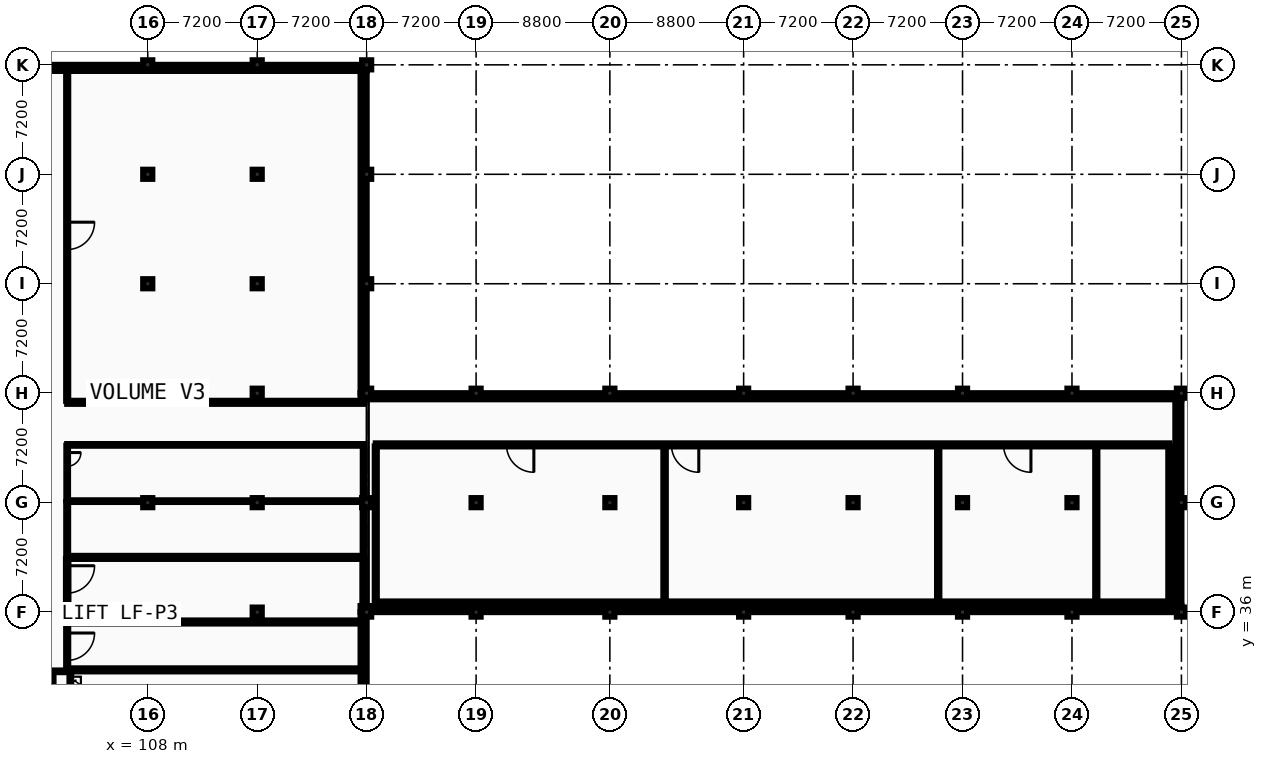
"""IFC4 building model, lengths in metres.
Left out: names, types, materials, properties, quantities, classifications, styles, units other than length and angle.
Written with IfcOpenShell. Run it as: python <this file> out.ifc"""

import sys

from ifc_helpers import new_model, si_unit, direction, frame, frame_2d, origin, origin_2d, place, context, subcontext, project, spatial, rectangle, extrude, element, fill, save


model = new_model("IFC4")
c1 = context("Model", 3, precision=1e-05, world=origin(), true_north=direction((0.0, 1.0)))
c2 = subcontext(c1, "Body", "Model", "MODEL_VIEW")
j1 = project(units=[si_unit("LENGTHUNIT", "METRE"), si_unit("PLANEANGLEUNIT", "RADIAN")], contexts=[c1])
p1 = place(None, origin())
s1 = spatial("IfcSite", under=j1, at=p1, CompositionType="ELEMENT")
p2 = place(p1, origin())
s2 = spatial("IfcBuilding", under=s1, at=p2, CompositionType="ELEMENT")
p3 = place(p2, frame((0.0, 0.0, -4.8)))
s3 = spatial("IfcBuildingStorey", under=s2, at=p3, CompositionType="ELEMENT", Elevation=-4.8)
for number, where, z_axis, x_axis in (
    (1, (108.0, 36.0, 0.0), (0.0, 0.0, 1.0), (1.0, 0.0, 0.0)),
    (2, (108.0, 43.2, 0.0), (0.0, 0.0, 1.0), (1.0, 0.0, 0.0)),
    (3, (108.0, 50.4, 0.0), (0.0, 0.0, 1.0), (1.0, 0.0, 0.0)),
    (4, (108.0, 57.6, 0.0), (0.0, 0.0, 1.0), (1.0, 0.0, 0.0)),
    (5, (108.0, 64.8, 0.0), (0.0, 0.0, 1.0), (1.0, 0.0, 0.0)),
    (6, (108.0, 72.0, 0.0), (0.0, 0.0, 1.0), (1.0, 0.0, 0.0)),
    (7, (115.2, 36.0, 0.0), (0.0, 0.0, 1.0), (1.0, 0.0, 0.0)),
    (8, (115.2, 43.2, 0.0), (0.0, 0.0, 1.0), (1.0, 0.0, 0.0)),
    (9, (115.2, 50.4, 0.0), (0.0, 0.0, 1.0), (1.0, 0.0, 0.0)),
    (10, (115.2, 57.6, 0.0), (0.0, 0.0, 1.0), (1.0, 0.0, 0.0)),
    (11, (115.2, 64.8, 0.0), (0.0, 0.0, 1.0), (1.0, 0.0, 0.0)),
    (12, (115.2, 72.0, 0.0), (0.0, 0.0, 1.0), (1.0, 0.0, 0.0)),
    (13, (122.4, 36.0, 0.0), (0.0, 0.0, 1.0), (1.0, 0.0, 0.0)),
    (14, (122.4, 43.2, 0.0), (0.0, 0.0, 1.0), (1.0, 0.0, 0.0)),
    (15, (122.4, 50.4, 0.0), (0.0, 0.0, 1.0), (1.0, 0.0, 0.0)),
    (16, (122.4, 57.6, 0.0), (0.0, 0.0, 1.0), (1.0, 0.0, 0.0)),
    (17, (122.4, 64.8, 0.0), (0.0, 0.0, 1.0), (1.0, 0.0, 0.0)),
    (18, (122.4, 72.0, 0.0), (0.0, 0.0, 1.0), (1.0, 0.0, 0.0)),
    (19, (129.6, 36.0, 0.0), (0.0, 0.0, 1.0), (1.0, 0.0, 0.0)),
    (20, (129.6, 43.2, 0.0), (0.0, 0.0, 1.0), (1.0, 0.0, 0.0)),
    (21, (129.6, 50.4, 0.0), (0.0, 0.0, 1.0), (1.0, 0.0, 0.0)),
    (22, (138.4, 36.0, 0.0), (0.0, 0.0, 1.0), (1.0, 0.0, 0.0)),
    (23, (138.4, 43.2, 0.0), (0.0, 0.0, 1.0), (1.0, 0.0, 0.0)),
    (24, (138.4, 50.4, 0.0), (0.0, 0.0, 1.0), (1.0, 0.0, 0.0)),
    (25, (147.2, 36.0, 0.0), (0.0, 0.0, 1.0), (1.0, 0.0, 0.0)),
    (26, (147.2, 43.2, 0.0), (0.0, 0.0, 1.0), (1.0, 0.0, 0.0)),
    (27, (147.2, 50.4, 0.0), (0.0, 0.0, 1.0), (1.0, 0.0, 0.0)),
    (28, (154.4, 36.0, 0.0), (0.0, 0.0, 1.0), (1.0, 0.0, 0.0)),
    (29, (154.4, 43.2, 0.0), (0.0, 0.0, 1.0), (1.0, 0.0, 0.0)),
    (30, (154.4, 50.4, 0.0), (0.0, 0.0, 1.0), (1.0, 0.0, 0.0)),
    (31, (161.6, 36.0, 0.0), (0.0, 0.0, 1.0), (1.0, 0.0, 0.0)),
    (32, (161.6, 43.2, 0.0), (0.0, 0.0, 1.0), (1.0, 0.0, 0.0)),
    (33, (161.6, 50.4, 0.0), (0.0, 0.0, 1.0), (1.0, 0.0, 0.0)),
    (34, (168.8, 36.0, 0.0), (0.0, 0.0, 1.0), (1.0, 0.0, 0.0)),
    (35, (168.8, 43.2, 0.0), (0.0, 0.0, 1.0), (1.0, 0.0, 0.0)),
    (36, (168.8, 50.4, 0.0), (0.0, 0.0, 1.0), (1.0, 0.0, 0.0)),
    (37, (176.0, 36.0, 0.0), (0.0, 0.0, 1.0), (1.0, 0.0, 0.0)),
    (38, (176.0, 43.2, 0.0), (0.0, 0.0, 1.0), (1.0, 0.0, 0.0)),
    (39, (176.0, 50.4, 0.0), (0.0, 0.0, 1.0), (1.0, 0.0, 0.0)),
):
    element("IfcColumn", number, at=place(p3, frame(where, z_axis=z_axis, x_axis=x_axis)), inside=s3, PredefinedType="COLUMN", context=c2, shape_type="SweptSolid", body=[
        extrude(rectangle(XDim=0.6, YDim=0.6, at=origin_2d()), origin(), (0.0, 0.0, 1.0), 4.8),
    ])
p4 = place(p3, frame((122.2, 29.2, 0.0), z_axis=(0.0, 0.0, 1.0), x_axis=(0.0, 1.0, 0.0)))
e40 = element("IfcWall", 40, at=p4, inside=s3, PredefinedType="USERDEFINED", context=c2, shape_type="SweptSolid", body=[
    extrude(rectangle(XDim=6.8, YDim=0.4, at=frame_2d((3.4, 0.0))), origin(), (0.0, 0.0, 1.0), 4.545),
])
p5 = place(p3, frame((122.0, 36.2, 0.0), z_axis=(0.0, 0.0, 1.0), x_axis=(1.0, 0.0, 0.0)))
e41 = element("IfcWall", 41, at=p5, inside=s3, PredefinedType="USERDEFINED", context=c2, shape_type="SweptSolid", body=[
    extrude(rectangle(XDim=54.0, YDim=0.4, at=frame_2d((27.0, 0.0))), origin(), (0.0, 0.0, 1.0), 4.545),
])
p6 = place(p3, frame((175.8, 36.4, 0.0), z_axis=(0.0, 0.0, 1.0), x_axis=(0.0, 1.0, 0.0)))
e42 = element("IfcWall", 42, at=p6, inside=s3, PredefinedType="USERDEFINED", context=c2, shape_type="SweptSolid", body=[
    extrude(rectangle(XDim=13.6, YDim=0.4, at=frame_2d((6.8, 0.0))), origin(), (0.0, 0.0, 1.0), 4.545),
])
p7 = place(p3, frame((176.0, 50.2, 0.0), z_axis=(0.0, 0.0, 1.0), x_axis=(-1.0, 0.0, 0.0)))
e43 = element("IfcWall", 43, at=p7, inside=s3, PredefinedType="USERDEFINED", context=c2, shape_type="SweptSolid", body=[
    extrude(rectangle(XDim=54.0, YDim=0.4, at=frame_2d((27.0, 0.0))), origin(), (0.0, 0.0, 1.0), 4.545),
])
p8 = place(p3, frame((122.2, 50.4, 0.0), z_axis=(0.0, 0.0, 1.0), x_axis=(0.0, 1.0, 0.0)))
e44 = element("IfcWall", 44, at=p8, inside=s3, PredefinedType="USERDEFINED", context=c2, shape_type="SweptSolid", body=[
    extrude(rectangle(XDim=21.2, YDim=0.4, at=frame_2d((10.6, 0.0))), origin(), (0.0, 0.0, 1.0), 4.545),
])
p9 = place(p3, frame((122.4, 71.8, 0.0), z_axis=(0.0, 0.0, 1.0), x_axis=(-1.0, 0.0, 0.0)))
e45 = element("IfcWall", 45, at=p9, inside=s3, PredefinedType="USERDEFINED", context=c2, shape_type="SweptSolid", body=[
    extrude(rectangle(XDim=29.2, YDim=0.4, at=frame_2d((14.6, 0.0))), origin(), (0.0, 0.0, 1.0), 4.545),
])
p10 = place(p3, frame((101.69, 32.105, 0.0), z_axis=(0.0, 0.0, 1.0), x_axis=(1.0, 0.0, 0.0)))
e46 = element("IfcWall", 46, at=p10, inside=s3, PredefinedType="PARTITIONING", context=c2, shape_type="SweptSolid", body=[
    extrude(rectangle(XDim=1.27, YDim=0.11, at=frame_2d((0.635, 0.0))), origin(), (0.0, 0.0, 1.0), 4.54),
])
for number, where, z_axis, x_axis in (
    (47, (101.745, 31.0, 0.0), (0.0, 0.0, 1.0), (0.0, 1.0, 0.0)),
    (48, (102.905, 31.0, 0.0), (0.0, 0.0, 1.0), (0.0, 1.0, 0.0)),
):
    element("IfcWall", number, at=place(p3, frame(where, z_axis=z_axis, x_axis=x_axis)), inside=s3, PredefinedType="PARTITIONING", context=c2, shape_type="SweptSolid", body=[
        extrude(rectangle(XDim=1.05, YDim=0.11, at=frame_2d((0.525, 0.0))), origin(), (0.0, 0.0, 1.0), 4.54),
    ])
p11 = place(p3, frame((103.035, 32.2, 0.0), z_axis=(0.0, 0.0, 1.0), x_axis=(1.0, 0.0, 0.0)))
e49 = element("IfcWall", 49, at=p11, inside=s3, PredefinedType="PARTITIONING", context=c2, shape_type="SweptSolid", body=[
    extrude(rectangle(XDim=18.945, YDim=0.2, at=frame_2d((9.473, 0.0))), origin(), (0.0, 0.0, 1.0), 4.545),
])
p12 = place(p3, frame((102.7, 35.35, 0.0), z_axis=(0.0, 0.0, 1.0), x_axis=(1.0, 0.0, 0.0)))
e50 = element("IfcWall", 50, at=p12, inside=s3, PredefinedType="PARTITIONING", context=c2, shape_type="SweptSolid", body=[
    extrude(rectangle(XDim=19.28, YDim=0.2, at=frame_2d((9.64, 0.0))), origin(), (0.0, 0.0, 1.0), 4.545),
])
p13 = place(p3, frame((123.0, 36.6, 0.0), z_axis=(0.0, 0.0, 1.0), x_axis=(1.0, 0.0, 0.0)))
e51 = element("IfcWall", 51, at=p13, inside=s3, PredefinedType="PARTITIONING", context=c2, shape_type="SweptSolid", body=[
    extrude(rectangle(XDim=52.2, YDim=0.2, at=frame_2d((26.1, 0.0))), origin(), (0.0, 0.0, 1.0), 4.545),
])
p14 = place(p3, frame((102.7, 39.6, 0.0), z_axis=(0.0, 0.0, 1.0), x_axis=(1.0, 0.0, 0.0)))
e52 = element("IfcWall", 52, at=p14, inside=s3, PredefinedType="PARTITIONING", context=c2, shape_type="SweptSolid", body=[
    extrude(rectangle(XDim=19.5, YDim=0.2, at=frame_2d((9.75, 0.0))), origin(), (0.0, 0.0, 1.0), 4.545),
])
p15 = place(p3, frame((102.7, 43.3, 0.0), z_axis=(0.0, 0.0, 1.0), x_axis=(1.0, 0.0, 0.0)))
e53 = element("IfcWall", 53, at=p15, inside=s3, PredefinedType="PARTITIONING", context=c2, shape_type="SweptSolid", body=[
    extrude(rectangle(XDim=4.92, YDim=0.11, at=frame_2d((2.46, 0.0))), origin(), (0.0, 0.0, 1.0), 4.095),
])
p16 = place(p3, frame((108.38, 43.3, 0.0), z_axis=(0.0, 0.0, 1.0), x_axis=(1.0, 0.0, 0.0)))
e54 = element("IfcWall", 54, at=p16, inside=s3, PredefinedType="PARTITIONING", context=c2, shape_type="SweptSolid", body=[
    extrude(rectangle(XDim=6.44, YDim=0.11, at=frame_2d((3.22, 0.0))), origin(), (0.0, 0.0, 1.0), 4.095),
])
p17 = place(p3, frame((115.58, 43.3, 0.0), z_axis=(0.0, 0.0, 1.0), x_axis=(1.0, 0.0, 0.0)))
e55 = element("IfcWall", 55, at=p17, inside=s3, PredefinedType="PARTITIONING", context=c2, shape_type="SweptSolid", body=[
    extrude(rectangle(XDim=6.44, YDim=0.11, at=frame_2d((3.22, 0.0))), origin(), (0.0, 0.0, 1.0), 4.095),
])
p18 = place(p3, frame((102.7, 47.0, 0.0), z_axis=(0.0, 0.0, 1.0), x_axis=(1.0, 0.0, 0.0)))
e56 = element("IfcWall", 56, at=p18, inside=s3, PredefinedType="PARTITIONING", context=c2, shape_type="SweptSolid", body=[
    extrude(rectangle(XDim=19.5, YDim=0.11, at=frame_2d((9.75, 0.0))), origin(), (0.0, 0.0, 1.0), 4.545),
])
p19 = place(p3, frame((123.0, 47.0, 0.0), z_axis=(0.0, 0.0, 1.0), x_axis=(1.0, 0.0, 0.0)))
e57 = element("IfcWall", 57, at=p19, inside=s3, PredefinedType="PARTITIONING", context=c2, shape_type="SweptSolid", body=[
    extrude(rectangle(XDim=52.2, YDim=0.2, at=frame_2d((26.1, 0.0))), origin(), (0.0, 0.0, 1.0), 4.545),
])
p20 = place(p19, frame((8.6, 0.0, 0.0)))
e58 = element("IfcOpeningElement", 58, at=p20, cuts=e57, PredefinedType="OPENING", context=c2, shape_type="SweptSolid", body=[
    extrude(rectangle(XDim=1.8, YDim=2.3, at=frame_2d((0.9, 1.15))), frame((0.0, 0.11, 0.0), z_axis=(0.0, -1.0, 0.0), x_axis=(1.0, 0.0, 0.0)), (0.0, 0.0, 1.0), 0.22),
])
p21 = place(p19, frame((19.45, 0.0, 0.0)))
e59 = element("IfcOpeningElement", 59, at=p21, cuts=e57, PredefinedType="OPENING", context=c2, shape_type="SweptSolid", body=[
    extrude(rectangle(XDim=1.8, YDim=2.3, at=frame_2d((0.9, 1.15))), frame((0.0, 0.11, 0.0), z_axis=(0.0, -1.0, 0.0), x_axis=(1.0, 0.0, 0.0)), (0.0, 0.0, 1.0), 0.22),
])
p22 = place(p19, frame((41.3, 0.0, 0.0)))
e60 = element("IfcOpeningElement", 60, at=p22, cuts=e57, PredefinedType="OPENING", context=c2, shape_type="SweptSolid", body=[
    extrude(rectangle(XDim=1.8, YDim=2.3, at=frame_2d((0.9, 1.15))), frame((0.0, 0.11, 0.0), z_axis=(0.0, -1.0, 0.0), x_axis=(1.0, 0.0, 0.0)), (0.0, 0.0, 1.0), 0.22),
])
p23 = place(p19, frame((49.3, 0.0, 0.0)))
e61 = element("IfcOpeningElement", 61, at=p23, cuts=e57, PredefinedType="OPENING", context=c2, shape_type="SweptSolid", body=[
    extrude(rectangle(XDim=1.0, YDim=2.1, at=frame_2d((0.5, 1.05))), frame((0.0, 0.11, 0.0), z_axis=(0.0, -1.0, 0.0), x_axis=(1.0, 0.0, 0.0)), (0.0, 0.0, 1.0), 0.22),
])
p24 = place(p3, frame((102.7, 49.8, 0.0), z_axis=(0.0, 0.0, 1.0), x_axis=(1.0, 0.0, 0.0)))
e62 = element("IfcWall", 62, at=p24, inside=s3, PredefinedType="PARTITIONING", context=c2, shape_type="SweptSolid", body=[
    extrude(rectangle(XDim=19.5, YDim=0.2, at=frame_2d((9.75, 0.0))), origin(), (0.0, 0.0, 1.0), 4.545),
])
p25 = place(p3, frame((102.7, 32.2, 0.0), z_axis=(0.0, 0.0, 1.0), x_axis=(0.0, 1.0, 0.0)))
e63 = element("IfcWall", 63, at=p25, inside=s3, PredefinedType="PARTITIONING", context=c2, shape_type="SweptSolid", body=[
    extrude(rectangle(XDim=3.05, YDim=0.135, at=frame_2d((1.525, 0.0))), origin(), (0.0, 0.0, 1.0), 4.545),
])
p26 = place(p25, frame((0.625, 0.0, 0.0)))
e64 = element("IfcOpeningElement", 64, at=p26, cuts=e63, PredefinedType="OPENING", context=c2, shape_type="SweptSolid", body=[
    extrude(rectangle(XDim=1.8, YDim=2.3, at=frame_2d((0.9, 1.15))), frame((0.0, 0.078, 0.0), z_axis=(0.0, -1.0, 0.0), x_axis=(1.0, 0.0, 0.0)), (0.0, 0.0, 1.0), 0.155),
])
p27 = place(p3, frame((102.7, 35.45, 0.0), z_axis=(0.0, 0.0, 1.0), x_axis=(0.0, 1.0, 0.0)))
e65 = element("IfcWall", 65, at=p27, inside=s3, PredefinedType="PARTITIONING", context=c2, shape_type="SweptSolid", body=[
    extrude(rectangle(XDim=4.05, YDim=0.16, at=frame_2d((2.025, 0.0))), origin(), (0.0, 0.0, 1.0), 4.545),
])
p28 = place(p27, frame((1.8, 0.0, 0.0)))
e66 = element("IfcOpeningElement", 66, at=p28, cuts=e65, PredefinedType="OPENING", context=c2, shape_type="SweptSolid", body=[
    extrude(rectangle(XDim=1.8, YDim=2.3, at=frame_2d((0.9, 1.15))), frame((0.0, 0.09, 0.0), z_axis=(0.0, -1.0, 0.0), x_axis=(1.0, 0.0, 0.0)), (0.0, 0.0, 1.0), 0.18),
])
p29 = place(p3, frame((102.7, 39.7, 0.0), z_axis=(0.0, 0.0, 1.0), x_axis=(0.0, 1.0, 0.0)))
e67 = element("IfcWall", 67, at=p29, inside=s3, PredefinedType="PARTITIONING", context=c2, shape_type="SweptSolid", body=[
    extrude(rectangle(XDim=3.545, YDim=0.125, at=frame_2d((1.772, 0.0))), origin(), (0.0, 0.0, 1.0), 4.545),
])
p30 = place(p29, frame((0.45, 0.0, 0.0)))
e68 = element("IfcOpeningElement", 68, at=p30, cuts=e67, PredefinedType="OPENING", context=c2, shape_type="SweptSolid", body=[
    extrude(rectangle(XDim=1.0, YDim=2.1, at=frame_2d((0.5, 1.05))), frame((0.0, 0.073, 0.0), z_axis=(0.0, -1.0, 0.0), x_axis=(1.0, 0.0, 0.0)), (0.0, 0.0, 1.0), 0.145),
])
p31 = place(p3, frame((102.7, 43.355, 0.0), z_axis=(0.0, 0.0, 1.0), x_axis=(0.0, 1.0, 0.0)))
e69 = element("IfcWall", 69, at=p31, inside=s3, PredefinedType="PARTITIONING", context=c2, shape_type="SweptSolid", body=[
    extrude(rectangle(XDim=3.59, YDim=0.11, at=frame_2d((1.795, 0.0))), origin(), (0.0, 0.0, 1.0), 4.545),
])
p32 = place(p31, frame((2.24, 0.0, 0.0)))
e70 = element("IfcOpeningElement", 70, at=p32, cuts=e69, PredefinedType="OPENING", context=c2, shape_type="SweptSolid", body=[
    extrude(rectangle(XDim=0.9, YDim=2.1, at=frame_2d((0.45, 1.05))), frame((0.0, 0.065, 0.0), z_axis=(0.0, -1.0, 0.0), x_axis=(1.0, 0.0, 0.0)), (0.0, 0.0, 1.0), 0.13),
])
p33 = place(p3, frame((102.7, 49.9, 0.0), z_axis=(0.0, 0.0, 1.0), x_axis=(0.0, 1.0, 0.0)))
e71 = element("IfcWall", 71, at=p33, inside=s3, PredefinedType="PARTITIONING", context=c2, shape_type="SweptSolid", body=[
    extrude(rectangle(XDim=21.7, YDim=0.135, at=frame_2d((10.85, 0.0))), origin(), (0.0, 0.0, 1.0), 4.545),
])
p34 = place(p33, frame((9.95, 0.0, 0.0)))
e72 = element("IfcOpeningElement", 72, at=p34, cuts=e71, PredefinedType="OPENING", context=c2, shape_type="SweptSolid", body=[
    extrude(rectangle(XDim=1.8, YDim=2.3, at=frame_2d((0.9, 1.15))), frame((0.0, 0.078, 0.0), z_axis=(0.0, -1.0, 0.0), x_axis=(1.0, 0.0, 0.0)), (0.0, 0.0, 1.0), 0.155),
])
p35 = place(p3, frame((122.2, 36.4, 0.0), z_axis=(0.0, 0.0, 1.0), x_axis=(0.0, 1.0, 0.0)))
e73 = element("IfcWall", 73, at=p35, inside=s3, PredefinedType="PARTITIONING", context=c2, shape_type="SweptSolid", body=[
    extrude(rectangle(XDim=3.1, YDim=0.16, at=frame_2d((1.55, 0.0))), origin(), (0.0, 0.0, 1.0), 4.245),
])
p36 = place(p3, frame((122.2, 39.7, 0.0), z_axis=(0.0, 0.0, 1.0), x_axis=(0.0, 1.0, 0.0)))
e74 = element("IfcWall", 74, at=p36, inside=s3, PredefinedType="PARTITIONING", context=c2, shape_type="SweptSolid", body=[
    extrude(rectangle(XDim=3.12, YDim=0.125, at=frame_2d((1.56, 0.0))), origin(), (0.0, 0.0, 1.0), 4.245),
])
p37 = place(p3, frame((122.2, 43.58, 0.0), z_axis=(0.0, 0.0, 1.0), x_axis=(0.0, 1.0, 0.0)))
e75 = element("IfcWall", 75, at=p37, inside=s3, PredefinedType="PARTITIONING", context=c2, shape_type="SweptSolid", body=[
    extrude(rectangle(XDim=3.365, YDim=0.11, at=frame_2d((1.683, 0.0))), origin(), (0.0, 0.0, 1.0), 4.245),
])
p38 = place(p3, frame((123.0, 36.7, 0.0), z_axis=(0.0, 0.0, 1.0), x_axis=(0.0, 1.0, 0.0)))
e76 = element("IfcWall", 76, at=p38, inside=s3, PredefinedType="PARTITIONING", context=c2, shape_type="SweptSolid", body=[
    extrude(rectangle(XDim=10.2, YDim=0.135, at=frame_2d((5.1, 0.0))), origin(), (0.0, 0.0, 1.0), 4.545),
])
p39 = place(p3, frame((142.0, 36.7, 0.0), z_axis=(0.0, 0.0, 1.0), x_axis=(0.0, 1.0, 0.0)))
e77 = element("IfcWall", 77, at=p39, inside=s3, PredefinedType="PARTITIONING", context=c2, shape_type="SweptSolid", body=[
    extrude(rectangle(XDim=10.2, YDim=0.16, at=frame_2d((5.1, 0.0))), origin(), (0.0, 0.0, 1.0), 4.545),
])
p40 = place(p3, frame((160.0, 36.7, 0.0), z_axis=(0.0, 0.0, 1.0), x_axis=(0.0, 1.0, 0.0)))
e78 = element("IfcWall", 78, at=p40, inside=s3, PredefinedType="PARTITIONING", context=c2, shape_type="SweptSolid", body=[
    extrude(rectangle(XDim=10.2, YDim=0.15, at=frame_2d((5.1, 0.0))), origin(), (0.0, 0.0, 1.0), 4.545),
])
p41 = place(p3, frame((170.4, 36.7, 0.0), z_axis=(0.0, 0.0, 1.0), x_axis=(0.0, 1.0, 0.0)))
e79 = element("IfcWall", 79, at=p41, inside=s3, PredefinedType="PARTITIONING", context=c2, shape_type="SweptSolid", body=[
    extrude(rectangle(XDim=10.2, YDim=0.142, at=frame_2d((5.1, 0.0))), origin(), (0.0, 0.0, 1.0), 4.545),
])
p42 = place(p3, frame((175.2, 36.7, 0.0), z_axis=(0.0, 0.0, 1.0), x_axis=(0.0, 1.0, 0.0)))
e80 = element("IfcWall", 80, at=p42, inside=s3, PredefinedType="PARTITIONING", context=c2, shape_type="SweptSolid", body=[
    extrude(rectangle(XDim=10.2, YDim=0.125, at=frame_2d((5.1, 0.0))), origin(), (0.0, 0.0, 1.0), 4.545),
])
p43 = place(p20, origin())
e81 = element("IfcDoor", 81, at=p43, inside=s3, OperationType="DOUBLE_DOOR_SINGLE_SWING", PredefinedType="DOOR", context=c2, shape_type="SweptSolid", body=[
    extrude(rectangle(XDim=1.8, YDim=2.3, at=frame_2d((0.9, 1.15))), frame((0.0, 0.025, 0.0), z_axis=(0.0, -1.0, 0.0), x_axis=(1.0, 0.0, 0.0)), (0.0, 0.0, 1.0), 0.05),
])
fill(e58, e81)
p44 = place(p21, origin())
e82 = element("IfcDoor", 82, at=p44, inside=s3, OperationType="DOUBLE_DOOR_SINGLE_SWING", PredefinedType="DOOR", context=c2, shape_type="SweptSolid", body=[
    extrude(rectangle(XDim=1.8, YDim=2.3, at=frame_2d((0.9, 1.15))), frame((0.0, 0.025, 0.0), z_axis=(0.0, -1.0, 0.0), x_axis=(1.0, 0.0, 0.0)), (0.0, 0.0, 1.0), 0.05),
])
fill(e59, e82)
p45 = place(p22, origin())
e83 = element("IfcDoor", 83, at=p45, inside=s3, OperationType="DOUBLE_DOOR_SINGLE_SWING", PredefinedType="DOOR", context=c2, shape_type="SweptSolid", body=[
    extrude(rectangle(XDim=1.8, YDim=2.3, at=frame_2d((0.9, 1.15))), frame((0.0, 0.025, 0.0), z_axis=(0.0, -1.0, 0.0), x_axis=(1.0, 0.0, 0.0)), (0.0, 0.0, 1.0), 0.05),
])
fill(e60, e83)
p46 = place(p23, origin())
e84 = element("IfcDoor", 84, at=p46, inside=s3, OperationType="SLIDING_TO_LEFT", PredefinedType="DOOR", context=c2, shape_type="SweptSolid", body=[
    extrude(rectangle(XDim=1.0, YDim=2.1, at=frame_2d((0.5, 1.05))), frame((0.0, 0.025, 0.0), z_axis=(0.0, -1.0, 0.0), x_axis=(1.0, 0.0, 0.0)), (0.0, 0.0, 1.0), 0.05),
])
fill(e61, e84)
p47 = place(p34, origin())
e85 = element("IfcDoor", 85, at=p47, inside=s3, OperationType="DOUBLE_DOOR_SINGLE_SWING", PredefinedType="DOOR", context=c2, shape_type="SweptSolid", body=[
    extrude(rectangle(XDim=1.8, YDim=2.3, at=frame_2d((0.9, 1.15))), frame((0.0, 0.025, 0.0), z_axis=(0.0, -1.0, 0.0), x_axis=(1.0, 0.0, 0.0)), (0.0, 0.0, 1.0), 0.05),
])
fill(e72, e85)
p48 = place(p26, origin())
e86 = element("IfcDoor", 86, at=p48, inside=s3, OperationType="DOUBLE_DOOR_SINGLE_SWING", PredefinedType="DOOR", context=c2, shape_type="SweptSolid", body=[
    extrude(rectangle(XDim=1.8, YDim=2.3, at=frame_2d((0.9, 1.15))), frame((0.0, 0.025, 0.0), z_axis=(0.0, -1.0, 0.0), x_axis=(1.0, 0.0, 0.0)), (0.0, 0.0, 1.0), 0.05),
])
fill(e64, e86)
p49 = place(p28, origin())
e87 = element("IfcDoor", 87, at=p49, inside=s3, OperationType="DOUBLE_DOOR_SINGLE_SWING", PredefinedType="DOOR", context=c2, shape_type="SweptSolid", body=[
    extrude(rectangle(XDim=1.8, YDim=2.3, at=frame_2d((0.9, 1.15))), frame((0.0, 0.025, 0.0), z_axis=(0.0, -1.0, 0.0), x_axis=(1.0, 0.0, 0.0)), (0.0, 0.0, 1.0), 0.05),
])
fill(e66, e87)
p50 = place(p30, origin())
e88 = element("IfcDoor", 88, at=p50, inside=s3, OperationType="SLIDING_TO_LEFT", PredefinedType="DOOR", context=c2, shape_type="SweptSolid", body=[
    extrude(rectangle(XDim=1.0, YDim=2.1, at=frame_2d((0.5, 1.05))), frame((0.0, 0.025, 0.0), z_axis=(0.0, -1.0, 0.0), x_axis=(1.0, 0.0, 0.0)), (0.0, 0.0, 1.0), 0.05),
])
fill(e68, e88)
p51 = place(p32, origin())
e89 = element("IfcDoor", 89, at=p51, inside=s3, OperationType="SINGLE_SWING_RIGHT", PredefinedType="DOOR", context=c2, shape_type="SweptSolid", body=[
    extrude(rectangle(XDim=0.9, YDim=2.1, at=frame_2d((0.45, 1.05))), frame((0.0, 0.025, 0.0), z_axis=(0.0, -1.0, 0.0), x_axis=(1.0, 0.0, 0.0)), (0.0, 0.0, 1.0), 0.05),
])
fill(e70, e89)
save(model, sys.argv[1])
